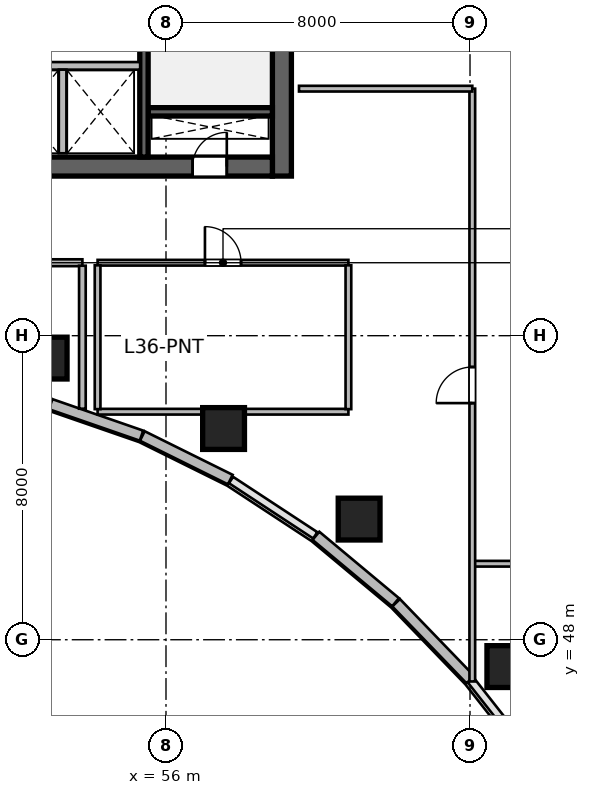
"""IFC4 building model, lengths in metres.
Left out: names, types, materials, properties, quantities, classifications, styles, units other than length and angle.
Written with IfcOpenShell. Run it as: python <this file> out.ifc"""

import sys

from ifc_helpers import new_model, si_unit, direction, frame, frame_2d, origin, origin_2d, place, context, subcontext, project, spatial, rectangle, circle, extrude, source, transform, mapped, element, fill, save


model = new_model("IFC4")
c1 = context("Model", 3, precision=1e-05, world=origin(), true_north=direction((0.0, 1.0)))
c2 = subcontext(c1, "Body", "Model", "MODEL_VIEW")
j1 = project(units=[si_unit("LENGTHUNIT", "METRE"), si_unit("PLANEANGLEUNIT", "RADIAN")], contexts=[c1])
p1 = place(None, origin())
s1 = spatial("IfcSite", under=j1, at=p1, CompositionType="ELEMENT")
p2 = place(p1, origin())
s2 = spatial("IfcBuilding", under=s1, at=p2, CompositionType="ELEMENT")
p3 = place(p2, frame((0.0, 0.0, 150.6)))
s3 = spatial("IfcBuildingStorey", under=s2, at=p3, CompositionType="ELEMENT", Elevation=150.6)
m1 = source(origin(), c2, "Body", "SweptSolid", [
    extrude(rectangle(XDim=12.0, YDim=0.5, at=frame_2d((6.0, 0.0))), origin(), (0.0, 0.0, 1.0), 3.9),
])
p4 = place(p3, frame((59.05, 60.2, 0.0), z_axis=(0.0, 0.0, 1.0), x_axis=(0.0, 1.0, 0.0)))
e1 = element("IfcWall", 1, at=p4, inside=s3, PredefinedType="SHEAR", context=c2, shape_type="MappedRepresentation", body=[
    mapped(m1, transform((0.0, 0.0, 0.0), scale=1.0)),
])
m2 = source(origin(), c2, "Body", "SweptSolid", [
    extrude(rectangle(XDim=21.6, YDim=0.5, at=frame_2d((10.8, 0.0))), origin(), (0.0, 0.0, 1.0), 3.9),
])
p5 = place(p3, frame((37.2, 60.45, 0.0), z_axis=(0.0, 0.0, 1.0), x_axis=(1.0, 0.0, 0.0)))
e2 = element("IfcWall", 2, at=p5, inside=s3, PredefinedType="SHEAR", context=c2, shape_type="MappedRepresentation", body=[
    mapped(m2, transform((0.0, 0.0, 0.0), scale=1.0)),
])
p6 = place(p5, frame((1.1, 0.0, 0.0)))
e3 = element("IfcOpeningElement", 3, at=p6, cuts=e2, PredefinedType="OPENING", context=c2, shape_type="SweptSolid", body=[
    extrude(rectangle(XDim=1.15, YDim=2.15, at=frame_2d((0.575, 1.075))), frame((0.0, 0.26, 0.0), z_axis=(0.0, -1.0, 0.0), x_axis=(1.0, 0.0, 0.0)), (0.0, 0.0, 1.0), 0.52),
])
p7 = place(p5, frame((19.5, 0.0, 0.0)))
e4 = element("IfcOpeningElement", 4, at=p7, cuts=e2, PredefinedType="OPENING", context=c2, shape_type="SweptSolid", body=[
    extrude(rectangle(XDim=0.9, YDim=2.1, at=frame_2d((0.45, 1.05))), frame((0.0, 0.26, 0.0), z_axis=(0.0, -1.0, 0.0), x_axis=(1.0, 0.0, 0.0)), (0.0, 0.0, 1.0), 0.52),
])
p8 = place(p5, frame((12.02, 0.0, 0.0)))
e5 = element("IfcOpeningElement", 5, at=p8, cuts=e2, PredefinedType="OPENING", context=c2, shape_type="SweptSolid", body=[
    extrude(rectangle(XDim=1.6, YDim=2.15, at=frame_2d((0.8, 1.075))), frame((0.0, 0.26, 0.0), z_axis=(0.0, -1.0, 0.0), x_axis=(1.0, 0.0, 0.0)), (0.0, 0.0, 1.0), 0.52),
])
m3 = source(origin(), c2, "Body", "SweptSolid", [
    extrude(rectangle(XDim=3.27, YDim=0.22, at=frame_2d((1.635, 0.0))), origin(), (0.0, 0.0, 1.0), 3.9),
])
p9 = place(p3, frame((55.53, 61.89, 0.0), z_axis=(0.0, 0.0, 1.0), x_axis=(1.0, 0.0, 0.0)))
e6 = element("IfcWall", 6, at=p9, inside=s3, PredefinedType="SHEAR", context=c2, shape_type="MappedRepresentation", body=[
    mapped(m3, transform((0.0, 0.0, 0.0), scale=1.0)),
])
m4 = source(origin(), c2, "Body", "SweptSolid", [
    extrude(rectangle(XDim=11.0, YDim=0.22, at=frame_2d((5.5, 0.0))), origin(), (0.0, 0.0, 1.0), 3.9),
])
p10 = place(p3, frame((55.42, 60.7, 0.0), z_axis=(0.0, 0.0, 1.0), x_axis=(0.0, 1.0, 0.0)))
e7 = element("IfcWall", 7, at=p10, inside=s3, PredefinedType="SHEAR", context=c2, shape_type="MappedRepresentation", body=[
    mapped(m4, transform((0.0, 0.0, 0.0), scale=1.0)),
])
p11 = place(p10, frame((9.545, 0.0, 0.0)))
e8 = element("IfcOpeningElement", 8, at=p11, cuts=e7, PredefinedType="OPENING", context=c2, shape_type="SweptSolid", body=[
    extrude(rectangle(XDim=1.15, YDim=2.15, at=frame_2d((0.575, 1.075))), frame((0.0, 0.12, 0.0), z_axis=(0.0, -1.0, 0.0), x_axis=(1.0, 0.0, 0.0)), (0.0, 0.0, 1.0), 0.24),
])
m5 = source(origin(), c2, "Body", "SweptSolid", [
    extrude(circle(Radius=0.55, at=origin_2d()), origin(), (0.0, 0.0, 1.0), 3.9),
])
for number, where, z_axis, x_axis in (
    (9, (52.846, 55.411, 0.0), (0.0, 0.0, 1.0), (0.143, 0.99, 0.0)),
    (10, (57.515, 53.558, 0.0), (0.0, 0.0, 1.0), (0.289, 0.957, 0.0)),
    (11, (61.082, 51.175, 0.0), (0.0, 0.0, 1.0), (0.409, 0.912, 0.0)),
    (12, (64.996, 47.294, 0.0), (0.0, 0.0, 1.0), (0.558, 0.83, 0.0)),
):
    element("IfcColumn", number, at=place(p3, frame(where, z_axis=z_axis, x_axis=x_axis)), inside=s3, PredefinedType="COLUMN", context=c2, shape_type="MappedRepresentation", body=[
        mapped(m5, transform((0.0, 0.0, 0.0), scale=1.0)),
    ])
m6 = source(origin(), c2, "Body", "SweptSolid", [
    extrude(rectangle(XDim=2.812, YDim=0.28, at=frame_2d((1.406, 0.0))), origin(), (0.0, 0.0, 1.0), 3.65),
])
p12 = place(p3, frame((64.008, 46.95, 0.0), z_axis=(0.0, 0.0, 1.0), x_axis=(-0.694583668785, 0.719411931411, 0.0)))
e13 = element("IfcWall", 13, at=p12, inside=s3, PredefinedType="SOLIDWALL", context=c2, shape_type="MappedRepresentation", body=[
    mapped(m6, transform((0.0, 0.0, 0.0), scale=1.0)),
])
m7 = source(origin(), c2, "Body", "SweptSolid", [
    extrude(rectangle(XDim=2.729, YDim=0.28, at=frame_2d((1.365, 0.0))), origin(), (0.0, 0.0, 1.0), 3.65),
])
p13 = place(p3, frame((62.041, 48.987, 0.0), z_axis=(0.0, 0.0, 1.0), x_axis=(-0.767957284255, 0.640501061326, 0.0)))
e14 = element("IfcWall", 14, at=p13, inside=s3, PredefinedType="SOLIDWALL", context=c2, shape_type="MappedRepresentation", body=[
    mapped(m7, transform((0.0, 0.0, 0.0), scale=1.0)),
])
m8 = source(origin(), c2, "Body", "SweptSolid", [
    extrude(rectangle(XDim=2.584, YDim=0.28, at=frame_2d((1.292, 0.0))), origin(), (0.0, 0.0, 1.0), 3.65),
])
p14 = place(p3, frame((57.692, 52.213, 0.0), z_axis=(0.0, 0.0, 1.0), x_axis=(-0.895989792847, 0.44407464588, 0.0)))
e15 = element("IfcWall", 15, at=p14, inside=s3, PredefinedType="SOLIDWALL", context=c2, shape_type="MappedRepresentation", body=[
    mapped(m8, transform((0.0, 0.0, 0.0), scale=1.0)),
])
m9 = source(origin(), c2, "Body", "SweptSolid", [
    extrude(rectangle(XDim=2.53, YDim=0.28, at=frame_2d((1.265, 0.0))), origin(), (0.0, 0.0, 1.0), 3.65),
])
p15 = place(p3, frame((55.355, 53.37, 0.0), z_axis=(0.0, 0.0, 1.0), x_axis=(-0.944872429646, 0.327438683872, 0.0)))
e16 = element("IfcWall", 16, at=p15, inside=s3, PredefinedType="SOLIDWALL", context=c2, shape_type="MappedRepresentation", body=[
    mapped(m9, transform((0.0, 0.0, 0.0), scale=1.0)),
])
m10 = source(origin(), c2, "Body", "SweptSolid", [
    extrude(rectangle(XDim=4.1, YDim=0.2, at=frame_2d((2.05, 0.0))), origin(), (0.0, 0.0, 1.0), 3.65),
])
p16 = place(p3, frame((51.22, 63.1, 0.0), z_axis=(0.0, 0.0, 1.0), x_axis=(1.0, 0.0, 0.0)))
e17 = element("IfcWall", 17, at=p16, inside=s3, PredefinedType="SOLIDWALL", context=c2, shape_type="MappedRepresentation", body=[
    mapped(m10, transform((0.0, 0.0, 0.0), scale=1.0)),
])
m11 = source(origin(), c2, "Body", "SweptSolid", [
    extrude(rectangle(XDim=2.2, YDim=0.2, at=frame_2d((1.1, 0.0))), origin(), (0.0, 0.0, 1.0), 3.65),
])
p17 = place(p3, frame((53.28, 60.8, 0.0), z_axis=(0.0, 0.0, 1.0), x_axis=(0.0, 1.0, 0.0)))
e18 = element("IfcWall", 18, at=p17, inside=s3, PredefinedType="SOLIDWALL", context=c2, shape_type="MappedRepresentation", body=[
    mapped(m11, transform((0.0, 0.0, 0.0), scale=1.0)),
])
m12 = source(origin(), c2, "Body", "SweptSolid", [
    extrude(rectangle(XDim=3.248, YDim=0.18, at=frame_2d((1.624, 0.0))), origin(), (0.0, 0.0, 1.0), 3.65),
])
p18 = place(p3, frame((50.552, 57.92, 0.0), z_axis=(0.0, 0.0, 1.0), x_axis=(1.0, 0.0, 0.0)))
e19 = element("IfcWall", 19, at=p18, inside=s3, PredefinedType="PLUMBINGWALL", context=c2, shape_type="MappedRepresentation", body=[
    mapped(m12, transform((0.0, 0.0, 0.0), scale=1.0)),
])
p19 = place(p18, frame((1.149, 0.0, 0.0)))
e20 = element("IfcOpeningElement", 20, at=p19, cuts=e19, PredefinedType="OPENING", context=c2, shape_type="SweptSolid", body=[
    extrude(rectangle(XDim=0.95, YDim=2.12, at=frame_2d((0.475, 1.06))), frame((0.0, 0.1, 0.0), z_axis=(0.0, -1.0, 0.0), x_axis=(1.0, 0.0, 0.0)), (0.0, 0.0, 1.0), 0.2),
])
m13 = source(origin(), c2, "Body", "SweptSolid", [
    extrude(rectangle(XDim=3.763, YDim=0.175, at=frame_2d((1.881, 0.0))), origin(), (0.0, 0.0, 1.0), 3.65),
])
p20 = place(p3, frame((53.8, 54.079, 0.0), z_axis=(0.0, 0.0, 1.0), x_axis=(0.0, 1.0, 0.0)))
e21 = element("IfcWall", 21, at=p20, inside=s3, PredefinedType="PARTITIONING", context=c2, shape_type="MappedRepresentation", body=[
    mapped(m13, transform((0.0, 0.0, 0.0), scale=1.0)),
])
m14 = source(origin(), c2, "Body", "SweptSolid", [
    extrude(rectangle(XDim=6.6, YDim=0.15, at=frame_2d((3.3, 0.0))), origin(), (0.0, 0.0, 1.0), 3.095),
])
p21 = place(p3, frame((54.2, 54.0, 0.0), z_axis=(0.0, 0.0, 1.0), x_axis=(1.0, 0.0, 0.0)))
e22 = element("IfcWall", 22, at=p21, inside=s3, PredefinedType="PARTITIONING", context=c2, shape_type="MappedRepresentation", body=[
    mapped(m14, transform((0.0, 0.0, 0.0), scale=1.0)),
])
m15 = source(origin(), c2, "Body", "SweptSolid", [
    extrude(rectangle(XDim=6.6, YDim=0.15, at=frame_2d((3.3, 0.0))), origin(), (0.0, 0.0, 1.0), 3.65),
])
p22 = place(p3, frame((54.2, 57.92, 0.0), z_axis=(0.0, 0.0, 1.0), x_axis=(1.0, 0.0, 0.0)))
e23 = element("IfcWall", 23, at=p22, inside=s3, PredefinedType="PARTITIONING", context=c2, shape_type="MappedRepresentation", body=[
    mapped(m15, transform((0.0, 0.0, 0.0), scale=1.0)),
])
p23 = place(p22, frame((2.825, 0.0, 0.0)))
e24 = element("IfcOpeningElement", 24, at=p23, cuts=e23, PredefinedType="OPENING", context=c2, shape_type="SweptSolid", body=[
    extrude(rectangle(XDim=0.95, YDim=2.1, at=frame_2d((0.475, 1.05))), frame((0.0, 0.085, 0.0), z_axis=(0.0, -1.0, 0.0), x_axis=(1.0, 0.0, 0.0)), (0.0, 0.0, 1.0), 0.17),
])
m16 = source(origin(), c2, "Body", "SweptSolid", [
    extrude(rectangle(XDim=3.785, YDim=0.15, at=frame_2d((1.893, 0.0))), origin(), (0.0, 0.0, 1.0), 3.65),
])
for number, where, z_axis, x_axis in (
    (25, (54.2, 54.067, 0.0), (0.0, 0.0, 1.0), (0.0, 1.0, 0.0)),
    (26, (60.8, 54.067, 0.0), (0.0, 0.0, 1.0), (0.0, 1.0, 0.0)),
):
    element("IfcWall", number, at=place(p3, frame(where, z_axis=z_axis, x_axis=x_axis)), inside=s3, PredefinedType="PARTITIONING", context=c2, shape_type="MappedRepresentation", body=[
        mapped(m16, transform((0.0, 0.0, 0.0), scale=1.0)),
    ])
m17 = source(origin(), c2, "Body", "SweptSolid", [
    extrude(rectangle(XDim=2.5, YDim=0.15, at=frame_2d((1.25, 0.0))), origin(), (0.0, 0.0, 1.0), 3.65),
])
p24 = place(p3, frame((64.1, 50.0, 0.0), z_axis=(0.0, 0.0, 1.0), x_axis=(1.0, 0.0, 0.0)))
e27 = element("IfcWall", 27, at=p24, inside=s3, PredefinedType="PARTITIONING", context=c2, shape_type="MappedRepresentation", body=[
    mapped(m17, transform((0.0, 0.0, 0.0), scale=1.0)),
])
m18 = source(origin(), c2, "Body", "SweptSolid", [
    extrude(rectangle(XDim=15.598, YDim=0.15, at=frame_2d((7.799, 0.0))), origin(), (0.0, 0.0, 1.0), 2.942),
])
p25 = place(p3, frame((64.06, 46.902, 0.0), z_axis=(0.0, 0.0, 1.0), x_axis=(0.0, 1.0, 0.0)))
e28 = element("IfcWall", 28, at=p25, inside=s3, PredefinedType="PARTITIONING", context=c2, shape_type="MappedRepresentation", body=[
    mapped(m18, transform((0.0, 0.0, 0.0), scale=1.0)),
])
p26 = place(p25, frame((7.324, 0.0, 0.0)))
e29 = element("IfcOpeningElement", 29, at=p26, cuts=e28, PredefinedType="OPENING", context=c2, shape_type="SweptSolid", body=[
    extrude(rectangle(XDim=0.95, YDim=2.1, at=frame_2d((0.475, 1.05))), frame((0.0, 0.085, 0.0), z_axis=(0.0, -1.0, 0.0), x_axis=(1.0, 0.0, 0.0)), (0.0, 0.0, 1.0), 0.17),
])
m19 = source(origin(), c2, "Body", "SweptSolid", [
    extrude(rectangle(XDim=4.56, YDim=0.15, at=frame_2d((2.28, 0.0))), origin(), (0.0, 0.0, 1.0), 3.65),
])
p27 = place(p3, frame((59.5, 62.5, 0.0), z_axis=(0.0, 0.0, 1.0), x_axis=(1.0, 0.0, 0.0)))
e30 = element("IfcWall", 30, at=p27, inside=s3, PredefinedType="PARTITIONING", context=c2, shape_type="MappedRepresentation", body=[
    mapped(m19, transform((0.0, 0.0, 0.0), scale=1.0)),
])
m20 = source(origin(), c2, "Body", "SweptSolid", [
    extrude(rectangle(XDim=0.9, YDim=2.1, at=frame_2d((0.45, 1.05))), frame((0.0, 0.025, 0.0), z_axis=(0.0, -1.0, 0.0), x_axis=(1.0, 0.0, 0.0)), (0.0, 0.0, 1.0), 0.05),
])
p28 = place(p7, origin())
e31 = element("IfcDoor", 31, at=p28, inside=s3, OperationType="SINGLE_SWING_RIGHT", PredefinedType="DOOR", context=c2, shape_type="MappedRepresentation", body=[
    mapped(m20, transform((0.0, 0.0, 0.0), scale=1.0)),
])
fill(e4, e31)
m21 = source(origin(), c2, "Body", "SweptSolid", [
    extrude(rectangle(XDim=0.95, YDim=2.1, at=frame_2d((0.475, 1.05))), frame((0.0, 0.025, 0.0), z_axis=(0.0, -1.0, 0.0), x_axis=(1.0, 0.0, 0.0)), (0.0, 0.0, 1.0), 0.05),
])
p29 = place(p23, origin())
e32 = element("IfcDoor", 32, at=p29, inside=s3, OperationType="SINGLE_SWING_LEFT", PredefinedType="DOOR", context=c2, shape_type="MappedRepresentation", body=[
    mapped(m21, transform((0.0, 0.0, 0.0), scale=1.0)),
])
fill(e24, e32)
p30 = place(p26, origin())
e33 = element("IfcDoor", 33, at=p30, inside=s3, OperationType="SINGLE_SWING_LEFT", PredefinedType="DOOR", context=c2, shape_type="MappedRepresentation", body=[
    mapped(m21, transform((0.0, 0.0, 0.0), scale=1.0)),
])
fill(e29, e33)
save(model, sys.argv[1])
